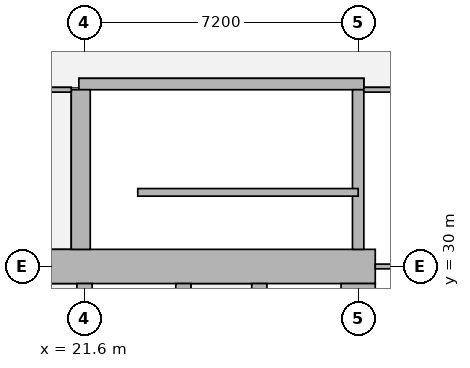
"""IFC4 building model, lengths in metres.
Left out: names, types, materials, properties, quantities, classifications, styles, units other than length and angle.
Written with IfcOpenShell. Run it as: python <this file> out.ifc"""

import sys

from ifc_helpers import new_model, si_unit, direction, frame, frame_2d, origin, place, context, subcontext, project, spatial, rectangle, extrude, element, fill, save


model = new_model("IFC4")
c1 = context("Model", 3, precision=1e-05, world=origin(), true_north=direction((0.0, 1.0)))
c2 = subcontext(c1, "Body", "Model", "MODEL_VIEW")
j1 = project(units=[si_unit("LENGTHUNIT", "METRE"), si_unit("PLANEANGLEUNIT", "RADIAN")], contexts=[c1])
p1 = place(None, origin())
s1 = spatial("IfcSite", under=j1, at=p1, CompositionType="ELEMENT")
p2 = place(p1, origin())
s2 = spatial("IfcBuilding", under=s1, at=p2, CompositionType="ELEMENT")
p3 = place(p2, frame((0.0, 0.0, 89.15)))
s3 = spatial("IfcBuildingStorey", under=s2, at=p3, CompositionType="ELEMENT", Elevation=89.15)
p4 = place(p3, frame((13.95, 30.0, 0.0), z_axis=(0.0, 0.0, 1.0), x_axis=(1.0, 0.0, 0.0)))
e1 = element("IfcWall", 1, at=p4, inside=s3, PredefinedType="SHEAR", context=c2, shape_type="SweptSolid", body=[
    extrude(rectangle(XDim=15.3, YDim=0.9, at=frame_2d((7.65, 0.0))), origin(), (0.0, 0.0, 1.0), 3.75),
])
p5 = place(p4, frame((4.45, 0.0, 0.0)))
e2 = element("IfcOpeningElement", 2, at=p5, cuts=e1, PredefinedType="OPENING", context=c2, shape_type="SweptSolid", body=[
    extrude(rectangle(XDim=1.8, YDim=2.1, at=frame_2d((0.9, 1.05))), frame((0.0, 0.46, 0.0), z_axis=(0.0, -1.0, 0.0), x_axis=(1.0, 0.0, 0.0)), (0.0, 0.0, 1.0), 0.92),
])
p6 = place(p4, frame((10.7, 0.0, 0.0)))
e3 = element("IfcOpeningElement", 3, at=p6, cuts=e1, PredefinedType="OPENING", context=c2, shape_type="SweptSolid", body=[
    extrude(rectangle(XDim=1.1, YDim=2.1, at=frame_2d((0.55, 1.05))), frame((0.0, 0.46, 0.0), z_axis=(0.0, -1.0, 0.0), x_axis=(1.0, 0.0, 0.0)), (0.0, 0.0, 1.0), 0.92),
])
p7 = place(p3, frame((28.8, 15.45, 0.0), z_axis=(0.0, 0.0, 1.0), x_axis=(0.0, 1.0, 0.0)))
e4 = element("IfcWall", 4, at=p7, inside=s3, PredefinedType="SHEAR", context=c2, shape_type="SweptSolid", body=[
    extrude(rectangle(XDim=14.1, YDim=0.9, at=frame_2d((7.05, 0.0))), origin(), (0.0, 0.0, 1.0), 3.75),
])
for number, where, z_axis, x_axis in (
    (5, (21.6, 15.45, 0.0), (0.0, 0.0, 1.0), (0.0, 1.0, 0.0)),
    (6, (24.2, 15.45, 0.0), (0.0, 0.0, 1.0), (0.0, 1.0, 0.0)),
):
    element("IfcWall", number, at=place(p3, frame(where, z_axis=z_axis, x_axis=x_axis)), inside=s3, PredefinedType="SHEAR", context=c2, shape_type="SweptSolid", body=[
        extrude(rectangle(XDim=14.1, YDim=0.4, at=frame_2d((7.05, 0.0))), origin(), (0.0, 0.0, 1.0), 3.75),
    ])
p8 = place(p3, frame((26.2, 26.45, 0.0), z_axis=(0.0, 0.0, 1.0), x_axis=(0.0, 1.0, 0.0)))
e7 = element("IfcWall", 7, at=p8, inside=s3, PredefinedType="SHEAR", context=c2, shape_type="SweptSolid", body=[
    extrude(rectangle(XDim=3.1, YDim=0.4, at=frame_2d((1.55, 0.0))), origin(), (0.0, 0.0, 1.0), 3.75),
])
p9 = place(p8, frame((1.075, 0.0, 0.0)))
e8 = element("IfcOpeningElement", 8, at=p9, cuts=e7, PredefinedType="OPENING", context=c2, shape_type="SweptSolid", body=[
    extrude(rectangle(XDim=1.2, YDim=2.1, at=frame_2d((0.6, 1.05))), frame((0.0, 0.21, 0.0), z_axis=(0.0, -1.0, 0.0), x_axis=(1.0, 0.0, 0.0)), (0.0, 0.0, 1.0), 0.42),
])
p10 = place(p3, frame((21.45, 34.8, 0.0), z_axis=(0.0, 0.0, 1.0), x_axis=(1.0, 0.0, 0.0)))
e9 = element("IfcWall", 9, at=p10, inside=s3, PredefinedType="SHEAR", context=c2, shape_type="SweptSolid", body=[
    extrude(rectangle(XDim=7.5, YDim=0.3, at=frame_2d((3.75, 0.0))), origin(), (0.0, 0.0, 1.0), 3.75),
])
p11 = place(p10, frame((0.5, 0.0, 0.0)))
e10 = element("IfcOpeningElement", 10, at=p11, cuts=e9, PredefinedType="OPENING", context=c2, shape_type="SweptSolid", body=[
    extrude(rectangle(XDim=1.1, YDim=2.1, at=frame_2d((0.55, 1.05))), frame((0.0, 0.16, 0.0), z_axis=(0.0, -1.0, 0.0), x_axis=(1.0, 0.0, 0.0)), (0.0, 0.0, 1.0), 0.32),
])
p12 = place(p3, frame((21.5, 30.45, 0.0), z_axis=(0.0, 0.0, 1.0), x_axis=(0.0, 1.0, 0.0)))
e11 = element("IfcWall", 11, at=p12, inside=s3, PredefinedType="SHEAR", context=c2, shape_type="SweptSolid", body=[
    extrude(rectangle(XDim=4.2, YDim=0.5, at=frame_2d((2.1, 0.0))), origin(), (0.0, 0.0, 1.0), 3.75),
])
p13 = place(p3, frame((28.8, 30.45, 0.0), z_axis=(0.0, 0.0, 1.0), x_axis=(0.0, 1.0, 0.0)))
e12 = element("IfcWall", 12, at=p13, inside=s3, PredefinedType="SHEAR", context=c2, shape_type="SweptSolid", body=[
    extrude(rectangle(XDim=4.2, YDim=0.3, at=frame_2d((2.1, 0.0))), origin(), (0.0, 0.0, 1.0), 3.75),
])
p14 = place(p3, frame((10.413, 34.65, 0.0), z_axis=(0.0, 0.0, 1.0), x_axis=(1.0, 0.0, 0.0)))
e13 = element("IfcWall", 13, at=p14, inside=s3, PredefinedType="PARTITIONING", context=c2, shape_type="SweptSolid", body=[
    extrude(rectangle(XDim=10.837, YDim=0.125, at=frame_2d((5.418, 0.0))), origin(), (0.0, 0.0, 1.0), 3.5),
])
p15 = place(p14, frame((7.487, 0.0, 0.0)))
e14 = element("IfcOpeningElement", 14, at=p15, cuts=e13, PredefinedType="OPENING", context=c2, shape_type="SweptSolid", body=[
    extrude(rectangle(XDim=1.8, YDim=2.1, at=frame_2d((0.9, 1.05))), frame((0.0, 0.073, 0.0), z_axis=(0.0, -1.0, 0.0), x_axis=(1.0, 0.0, 0.0)), (0.0, 0.0, 1.0), 0.145),
])
p16 = place(p3, frame((28.95, 34.65, 0.0), z_axis=(0.0, 0.0, 1.0), x_axis=(1.0, 0.0, 0.0)))
e15 = element("IfcWall", 15, at=p16, inside=s3, PredefinedType="PARTITIONING", context=c2, shape_type="SweptSolid", body=[
    extrude(rectangle(XDim=4.381, YDim=0.125, at=frame_2d((2.19, 0.0))), origin(), (0.0, 0.0, 1.0), 3.5),
])
p17 = place(p3, frame((29.25, 30.0, 0.0), z_axis=(0.0, 0.0, 1.0), x_axis=(1.0, 0.0, 0.0)))
e16 = element("IfcWall", 16, at=p17, inside=s3, PredefinedType="PARTITIONING", context=c2, shape_type="SweptSolid", body=[
    extrude(rectangle(XDim=2.949, YDim=0.125, at=frame_2d((1.475, 0.0))), origin(), (0.0, 0.0, 1.0), 3.5),
])
p18 = place(p3, frame((23.0, 31.95, 0.0), z_axis=(0.0, 0.0, 1.0), x_axis=(1.0, 0.0, 0.0)))
e17 = element("IfcWall", 17, at=p18, inside=s3, PredefinedType="SHEAR", context=c2, shape_type="SweptSolid", body=[
    extrude(rectangle(XDim=5.8, YDim=0.2, at=frame_2d((2.9, 0.0))), origin(), (0.0, 0.0, 1.0), 3.75),
])
p19 = place(p6, origin())
e18 = element("IfcDoor", 18, at=p19, inside=s3, OperationType="SINGLE_SWING_LEFT", PredefinedType="DOOR", context=c2, shape_type="SweptSolid", body=[
    extrude(rectangle(XDim=1.1, YDim=2.1, at=frame_2d((0.55, 1.05))), frame((0.0, 0.025, 0.0), z_axis=(0.0, -1.0, 0.0), x_axis=(1.0, 0.0, 0.0)), (0.0, 0.0, 1.0), 0.05),
])
fill(e3, e18)
p20 = place(p11, origin())
e19 = element("IfcDoor", 19, at=p20, inside=s3, OperationType="SINGLE_SWING_RIGHT", PredefinedType="DOOR", context=c2, shape_type="SweptSolid", body=[
    extrude(rectangle(XDim=1.1, YDim=2.1, at=frame_2d((0.55, 1.05))), frame((0.0, 0.025, 0.0), z_axis=(0.0, -1.0, 0.0), x_axis=(1.0, 0.0, 0.0)), (0.0, 0.0, 1.0), 0.05),
])
fill(e10, e19)
save(model, sys.argv[1])
